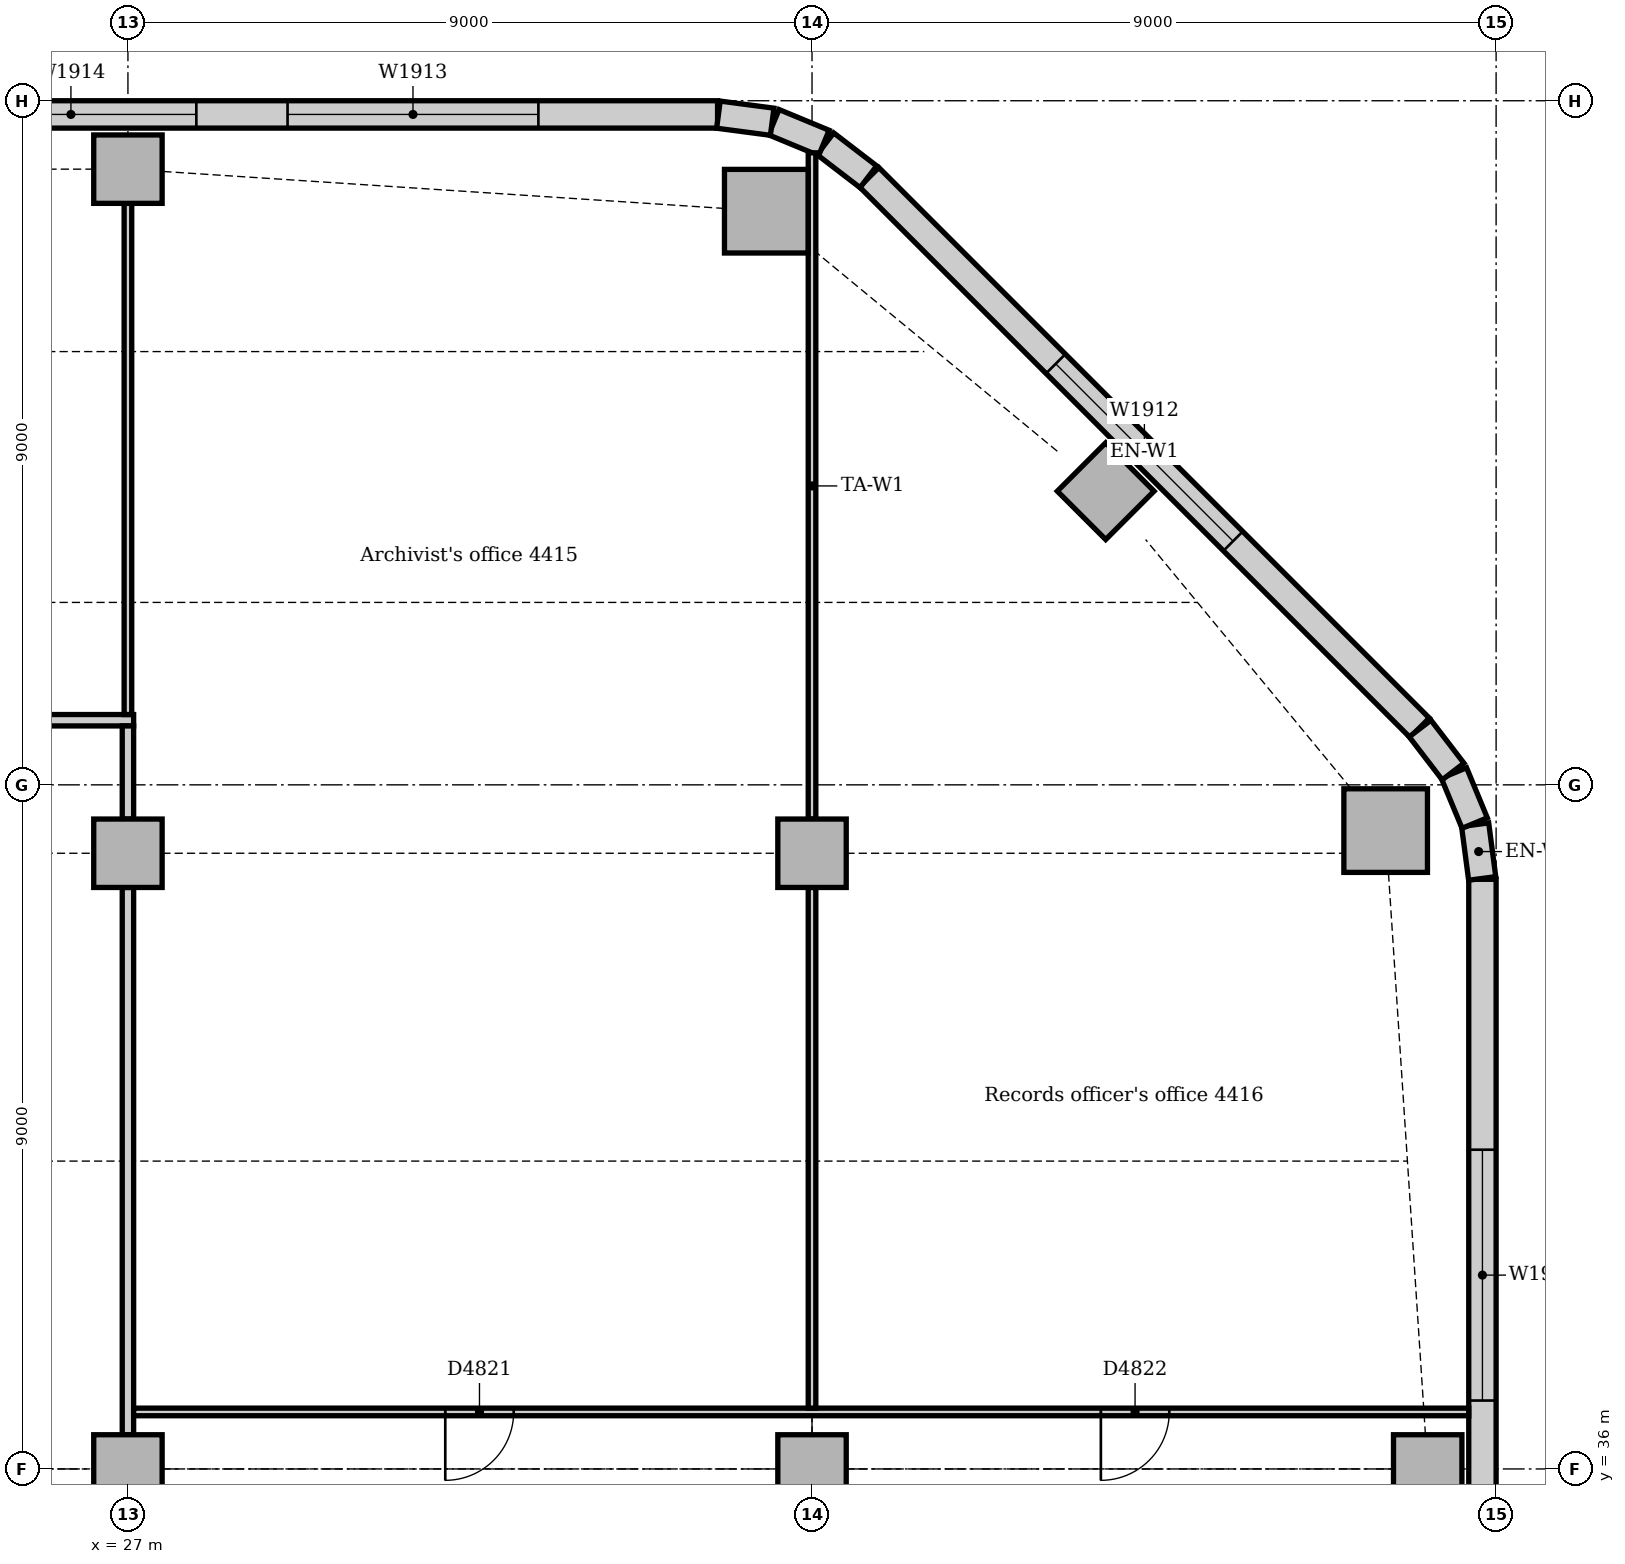
"""IFC4 building model, lengths in metres.
Left out: names, types, materials, properties, quantities, classifications, styles, units other than length and angle.
Written with IfcOpenShell. Run it as: python <this file> out.ifc"""

import sys

from ifc_helpers import new_model, si_unit, direction, frame, frame_2d, origin, origin_2d, place, context, subcontext, project, spatial, rectangle, extrude, element, fill, save


model = new_model("IFC4")
c1 = context("Model", 3, precision=1e-05, world=origin(), true_north=direction((0.0, 1.0)))
c2 = subcontext(c1, "Body", "Model", "MODEL_VIEW")
j1 = project(units=[si_unit("LENGTHUNIT", "METRE"), si_unit("PLANEANGLEUNIT", "RADIAN")], contexts=[c1])
p1 = place(None, origin())
s1 = spatial("IfcSite", under=j1, at=p1, CompositionType="ELEMENT")
p2 = place(p1, origin())
s2 = spatial("IfcBuilding", under=s1, at=p2, CompositionType="ELEMENT")
p3 = place(p2, frame((0.0, 0.0, 185.0)))
s3 = spatial("IfcBuildingStorey", under=s2, at=p3, CompositionType="ELEMENT", Elevation=185.0)
for number, where, z_axis, x_axis in (
    (1, (43.547, 44.398, 0.0), (0.0, 0.0, 1.0), (1.0, 0.0, 0.0)),
    (2, (35.398, 52.547, 0.0), (0.0, 0.0, 1.0), (1.0, 0.0, 0.0)),
):
    element("IfcColumn", number, at=place(p3, frame(where, z_axis=z_axis, x_axis=x_axis)), inside=s3, PredefinedType="COLUMN", context=c2, shape_type="SweptSolid", body=[
        extrude(rectangle(XDim=1.1, YDim=1.1, at=origin_2d()), origin(), (0.0, 0.0, 1.0), 3.85),
    ])
for number, where, z_axis, x_axis in (
    (3, (44.1, 36.0, 0.0), (0.0, 0.0, 1.0), (1.0, 0.0, 0.0)),
    (4, (39.864, 48.864, 0.0), (0.0, 0.0, 1.0), (0.707, 0.707, 0.0)),
    (5, (27.0, 53.1, 0.0), (0.0, 0.0, 1.0), (1.0, 0.0, 0.0)),
    (6, (27.0, 36.0, 0.0), (0.0, 0.0, 1.0), (1.0, 0.0, 0.0)),
    (7, (27.0, 44.1, 0.0), (0.0, 0.0, 1.0), (1.0, 0.0, 0.0)),
    (8, (36.0, 36.0, 0.0), (0.0, 0.0, 1.0), (1.0, 0.0, 0.0)),
    (9, (36.0, 44.1, 0.0), (0.0, 0.0, 1.0), (1.0, 0.0, 0.0)),
):
    element("IfcColumn", number, at=place(p3, frame(where, z_axis=z_axis, x_axis=x_axis)), inside=s3, PredefinedType="COLUMN", context=c2, shape_type="SweptSolid", body=[
        extrude(rectangle(XDim=0.9, YDim=0.9, at=origin_2d()), origin(), (0.0, 0.0, 1.0), 3.85),
    ])
p4 = place(p3, frame((44.82, 19.243, 0.0), z_axis=(0.0, 0.0, 1.0), x_axis=(0.0, 1.0, 0.0)))
e10 = element("IfcWall", 10, at=p4, inside=s3, PredefinedType="STANDARD", context=c2, shape_type="SweptSolid", body=[
    extrude(rectangle(XDim=24.515, YDim=0.36, at=frame_2d((12.257, 0.0))), origin(), (0.0, 0.0, 1.0), 3.85),
])
p5 = place(p4, frame((3.507, 0.0, 0.9)))
e11 = element("IfcOpeningElement", 11, at=p5, cuts=e10, PredefinedType="OPENING", context=c2, shape_type="SweptSolid", body=[
    extrude(rectangle(XDim=3.3, YDim=1.6, at=frame_2d((1.65, 0.8))), frame((0.0, 0.19, 0.0), z_axis=(0.0, -1.0, 0.0), x_axis=(1.0, 0.0, 0.0)), (0.0, 0.0, 1.0), 0.38),
])
p6 = place(p4, frame((8.357, 0.0, 0.9)))
e12 = element("IfcOpeningElement", 12, at=p6, cuts=e10, PredefinedType="OPENING", context=c2, shape_type="SweptSolid", body=[
    extrude(rectangle(XDim=3.3, YDim=1.6, at=frame_2d((1.65, 0.8))), frame((0.0, 0.19, 0.0), z_axis=(0.0, -1.0, 0.0), x_axis=(1.0, 0.0, 0.0)), (0.0, 0.0, 1.0), 0.38),
])
p7 = place(p4, frame((12.857, 0.0, 0.9)))
e13 = element("IfcOpeningElement", 13, at=p7, cuts=e10, PredefinedType="OPENING", context=c2, shape_type="SweptSolid", body=[
    extrude(rectangle(XDim=3.3, YDim=1.6, at=frame_2d((1.65, 0.8))), frame((0.0, 0.19, 0.0), z_axis=(0.0, -1.0, 0.0), x_axis=(1.0, 0.0, 0.0)), (0.0, 0.0, 1.0), 0.38),
])
p8 = place(p4, frame((17.657, 0.0, 0.9)))
e14 = element("IfcOpeningElement", 14, at=p8, cuts=e10, PredefinedType="OPENING", context=c2, shape_type="SweptSolid", body=[
    extrude(rectangle(XDim=3.3, YDim=1.6, at=frame_2d((1.65, 0.8))), frame((0.0, 0.19, 0.0), z_axis=(0.0, -1.0, 0.0), x_axis=(1.0, 0.0, 0.0)), (0.0, 0.0, 1.0), 0.38),
])
p9 = place(p3, frame((43.994, 45.751, 0.0), z_axis=(0.0, 0.0, 1.0), x_axis=(-0.707106781187, 0.707106781187, 0.0)))
e15 = element("IfcWall", 15, at=p9, inside=s3, PredefinedType="STANDARD", context=c2, shape_type="SweptSolid", body=[
    extrude(rectangle(XDim=10.243, YDim=0.36, at=frame_2d((5.121, 0.0))), origin(), (0.0, 0.0, 1.0), 3.85),
])
p10 = place(p9, frame((3.471, 0.0, 0.9)))
e16 = element("IfcOpeningElement", 16, at=p10, cuts=e15, PredefinedType="OPENING", context=c2, shape_type="SweptSolid", body=[
    extrude(rectangle(XDim=3.3, YDim=1.6, at=frame_2d((1.65, 0.8))), frame((0.0, 0.19, 0.0), z_axis=(0.0, -1.0, 0.0), x_axis=(1.0, 0.0, 0.0)), (0.0, 0.0, 1.0), 0.38),
])
p11 = place(p3, frame((34.757, 53.82, 0.0), z_axis=(0.0, 0.0, 1.0), x_axis=(-1.0, 0.0, 0.0)))
e17 = element("IfcWall", 17, at=p11, inside=s3, PredefinedType="STANDARD", context=c2, shape_type="SweptSolid", body=[
    extrude(rectangle(XDim=30.515, YDim=0.36, at=frame_2d((15.257, 0.0))), origin(), (0.0, 0.0, 1.0), 3.85),
])
p12 = place(p11, frame((2.357, 0.0, 0.9)))
e18 = element("IfcOpeningElement", 18, at=p12, cuts=e17, PredefinedType="OPENING", context=c2, shape_type="SweptSolid", body=[
    extrude(rectangle(XDim=3.3, YDim=1.6, at=frame_2d((1.65, 0.8))), frame((0.0, 0.19, 0.0), z_axis=(0.0, -1.0, 0.0), x_axis=(1.0, 0.0, 0.0)), (0.0, 0.0, 1.0), 0.38),
])
p13 = place(p11, frame((6.857, 0.0, 0.9)))
e19 = element("IfcOpeningElement", 19, at=p13, cuts=e17, PredefinedType="OPENING", context=c2, shape_type="SweptSolid", body=[
    extrude(rectangle(XDim=3.3, YDim=1.6, at=frame_2d((1.65, 0.8))), frame((0.0, 0.19, 0.0), z_axis=(0.0, -1.0, 0.0), x_axis=(1.0, 0.0, 0.0)), (0.0, 0.0, 1.0), 0.38),
])
p14 = place(p11, frame((11.357, 0.0, 0.9)))
e20 = element("IfcOpeningElement", 20, at=p14, cuts=e17, PredefinedType="OPENING", context=c2, shape_type="SweptSolid", body=[
    extrude(rectangle(XDim=3.3, YDim=1.6, at=frame_2d((1.65, 0.8))), frame((0.0, 0.19, 0.0), z_axis=(0.0, -1.0, 0.0), x_axis=(1.0, 0.0, 0.0)), (0.0, 0.0, 1.0), 0.38),
])
p15 = place(p11, frame((15.857, 0.0, 0.9)))
e21 = element("IfcOpeningElement", 21, at=p15, cuts=e17, PredefinedType="OPENING", context=c2, shape_type="SweptSolid", body=[
    extrude(rectangle(XDim=3.3, YDim=1.6, at=frame_2d((1.65, 0.8))), frame((0.0, 0.19, 0.0), z_axis=(0.0, -1.0, 0.0), x_axis=(1.0, 0.0, 0.0)), (0.0, 0.0, 1.0), 0.38),
])
p16 = place(p11, frame((21.457, 0.0, 0.9)))
e22 = element("IfcOpeningElement", 22, at=p16, cuts=e17, PredefinedType="OPENING", context=c2, shape_type="SweptSolid", body=[
    extrude(rectangle(XDim=1.8, YDim=1.6, at=frame_2d((0.9, 0.8))), frame((0.0, 0.19, 0.0), z_axis=(0.0, -1.0, 0.0), x_axis=(1.0, 0.0, 0.0)), (0.0, 0.0, 1.0), 0.38),
])
p17 = place(p11, frame((24.857, 0.0, 0.9)))
e23 = element("IfcOpeningElement", 23, at=p17, cuts=e17, PredefinedType="OPENING", context=c2, shape_type="SweptSolid", body=[
    extrude(rectangle(XDim=3.3, YDim=1.6, at=frame_2d((1.65, 0.8))), frame((0.0, 0.19, 0.0), z_axis=(0.0, -1.0, 0.0), x_axis=(1.0, 0.0, 0.0)), (0.0, 0.0, 1.0), 0.38),
])
for number, where, z_axis, x_axis in (
    (24, (44.817, 43.769, 0.0), (0.0, 0.0, 1.0), (-0.131, 0.991, 0.0)),
    (25, (44.718, 44.497, 0.0), (0.0, 0.0, 1.0), (-0.383, 0.924, 0.0)),
):
    element("IfcWall", number, at=place(p3, frame(where, z_axis=z_axis, x_axis=x_axis)), inside=s3, PredefinedType="STANDARD", context=c2, shape_type="SweptSolid", body=[
        extrude(rectangle(XDim=0.713, YDim=0.36, at=frame_2d((0.356, 0.0))), origin(), (0.0, 0.0, 1.0), 3.85),
    ])
for number, where, z_axis, x_axis in (
    (26, (44.434, 45.175, 0.0), (0.0, 0.0, 1.0), (-0.609, 0.793, 0.0)),
    (27, (36.741, 53.0, 0.0), (0.0, 0.0, 1.0), (-0.793, 0.609, 0.0)),
):
    element("IfcWall", number, at=place(p3, frame(where, z_axis=z_axis, x_axis=x_axis)), inside=s3, PredefinedType="STANDARD", context=c2, shape_type="SweptSolid", body=[
        extrude(rectangle(XDim=0.713, YDim=0.36, at=frame_2d((0.357, 0.0))), origin(), (0.0, 0.0, 1.0), 3.85),
    ])
for number, where, z_axis, x_axis in (
    (28, (36.156, 53.445, 0.0), (0.0, 0.0, 1.0), (-0.924, 0.383, 0.0)),
    (29, (35.476, 53.724, 0.0), (0.0, 0.0, 1.0), (-0.991, 0.131, 0.0)),
):
    element("IfcWall", number, at=place(p3, frame(where, z_axis=z_axis, x_axis=x_axis)), inside=s3, PredefinedType="STANDARD", context=c2, shape_type="SweptSolid", body=[
        extrude(rectangle(XDim=0.713, YDim=0.36, at=frame_2d((0.356, 0.0))), origin(), (0.0, 0.0, 1.0), 3.85),
    ])
p18 = place(p3, frame((1.903, 45.85, 0.0), z_axis=(0.0, 0.0, 1.0), x_axis=(1.0, 0.0, 0.0)))
e30 = element("IfcWall", 30, at=p18, inside=s3, PredefinedType="PARTITIONING", context=c2, shape_type="SweptSolid", body=[
    extrude(rectangle(XDim=25.172, YDim=0.15, at=frame_2d((12.586, 0.0))), origin(), (0.0, 0.0, 1.0), 3.85),
])
p19 = place(p18, frame((5.4, 0.0, 0.0)))
e31 = element("IfcOpeningElement", 31, at=p19, cuts=e30, PredefinedType="OPENING", context=c2, shape_type="SweptSolid", body=[
    extrude(rectangle(XDim=0.9, YDim=2.1, at=frame_2d((0.45, 1.05))), frame((0.0, 0.085, 0.0), z_axis=(0.0, -1.0, 0.0), x_axis=(1.0, 0.0, 0.0)), (0.0, 0.0, 1.0), 0.17),
])
p20 = place(p18, frame((15.647, 0.0, 0.0)))
e32 = element("IfcOpeningElement", 32, at=p20, cuts=e30, PredefinedType="OPENING", context=c2, shape_type="SweptSolid", body=[
    extrude(rectangle(XDim=0.9, YDim=2.1, at=frame_2d((0.45, 1.05))), frame((0.0, 0.085, 0.0), z_axis=(0.0, -1.0, 0.0), x_axis=(1.0, 0.0, 0.0)), (0.0, 0.0, 1.0), 0.17),
])
p21 = place(p3, frame((27.0, 36.45, 0.0), z_axis=(0.0, 0.0, 1.0), x_axis=(0.0, 1.0, 0.0)))
e33 = element("IfcWall", 33, at=p21, inside=s3, PredefinedType="PARTITIONING", context=c2, shape_type="SweptSolid", body=[
    extrude(rectangle(XDim=7.2, YDim=0.15, at=frame_2d((3.6, 0.0))), origin(), (0.0, 0.0, 1.0), 3.362),
])
p22 = place(p3, frame((27.0, 44.55, 0.0), z_axis=(0.0, 0.0, 1.0), x_axis=(0.0, 1.0, 0.0)))
e34 = element("IfcWall", 34, at=p22, inside=s3, PredefinedType="PARTITIONING", context=c2, shape_type="SweptSolid", body=[
    extrude(rectangle(XDim=1.225, YDim=0.15, at=frame_2d((0.613, 0.0))), origin(), (0.0, 0.0, 1.0), 3.362),
])
p23 = place(p3, frame((27.075, 36.75, 0.0), z_axis=(0.0, 0.0, 1.0), x_axis=(1.0, 0.0, 0.0)))
e35 = element("IfcWall", 35, at=p23, inside=s3, PredefinedType="PARTITIONING", context=c2, shape_type="SweptSolid", body=[
    extrude(rectangle(XDim=17.565, YDim=0.1, at=frame_2d((8.783, 0.0))), origin(), (0.0, 0.0, 1.0), 3.85),
])
p24 = place(p23, frame((4.1, 0.0, 0.0)))
e36 = element("IfcOpeningElement", 36, at=p24, cuts=e35, PredefinedType="OPENING", context=c2, shape_type="SweptSolid", body=[
    extrude(rectangle(XDim=0.9, YDim=2.1, at=frame_2d((0.45, 1.05))), frame((0.0, 0.06, 0.0), z_axis=(0.0, -1.0, 0.0), x_axis=(1.0, 0.0, 0.0)), (0.0, 0.0, 1.0), 0.12),
])
p25 = place(p23, frame((12.725, 0.0, 0.0)))
e37 = element("IfcOpeningElement", 37, at=p25, cuts=e35, PredefinedType="OPENING", context=c2, shape_type="SweptSolid", body=[
    extrude(rectangle(XDim=0.9, YDim=2.1, at=frame_2d((0.45, 1.05))), frame((0.0, 0.06, 0.0), z_axis=(0.0, -1.0, 0.0), x_axis=(1.0, 0.0, 0.0)), (0.0, 0.0, 1.0), 0.12),
])
p26 = place(p3, frame((36.0, 36.8, 0.0), z_axis=(0.0, 0.0, 1.0), x_axis=(0.0, 1.0, 0.0)))
e38 = element("IfcWall", 38, at=p26, inside=s3, PredefinedType="PARTITIONING", context=c2, shape_type="SweptSolid", body=[
    extrude(rectangle(XDim=6.85, YDim=0.1, at=frame_2d((3.425, 0.0))), origin(), (0.0, 0.0, 1.0), 3.362),
])
p27 = place(p3, frame((36.0, 44.55, 0.0), z_axis=(0.0, 0.0, 1.0), x_axis=(0.0, 1.0, 0.0)))
e39 = element("IfcWall", 39, at=p27, inside=s3, PredefinedType="PARTITIONING", context=c2, shape_type="SweptSolid", body=[
    extrude(rectangle(XDim=8.765, YDim=0.1, at=frame_2d((4.383, 0.0))), origin(), (0.0, 0.0, 1.0), 3.362),
])
p28 = place(p3, frame((27.0, 45.925, 0.0), z_axis=(0.0, 0.0, 1.0), x_axis=(0.0, 1.0, 0.0)))
e40 = element("IfcWall", 40, at=p28, inside=s3, PredefinedType="PARTITIONING", context=c2, shape_type="SweptSolid", body=[
    extrude(rectangle(XDim=6.725, YDim=0.1, at=frame_2d((3.362, 0.0))), origin(), (0.0, 0.0, 1.0), 3.362),
])
p29 = place(p8, origin())
e41 = element("IfcWindow", 41, at=p29, inside=s3, PartitioningType="SINGLE_PANEL", PredefinedType="WINDOW", context=c2, shape_type="SweptSolid", body=[
    extrude(rectangle(XDim=3.3, YDim=1.6, at=frame_2d((1.65, 0.8))), frame((0.0, 0.13, 0.0), z_axis=(0.0, -1.0, 0.0), x_axis=(1.0, 0.0, 0.0)), (0.0, 0.0, 1.0), 0.06),
])
fill(e14, e41)
p30 = place(p10, origin())
e42 = element("IfcWindow", 42, at=p30, inside=s3, PartitioningType="SINGLE_PANEL", PredefinedType="WINDOW", context=c2, shape_type="SweptSolid", body=[
    extrude(rectangle(XDim=3.3, YDim=1.6, at=frame_2d((1.65, 0.8))), frame((0.0, 0.13, 0.0), z_axis=(0.0, -1.0, 0.0), x_axis=(1.0, 0.0, 0.0)), (0.0, 0.0, 1.0), 0.06),
])
fill(e16, e42)
p31 = place(p12, origin())
e43 = element("IfcWindow", 43, at=p31, inside=s3, PartitioningType="SINGLE_PANEL", PredefinedType="WINDOW", context=c2, shape_type="SweptSolid", body=[
    extrude(rectangle(XDim=3.3, YDim=1.6, at=frame_2d((1.65, 0.8))), frame((0.0, 0.13, 0.0), z_axis=(0.0, -1.0, 0.0), x_axis=(1.0, 0.0, 0.0)), (0.0, 0.0, 1.0), 0.06),
])
fill(e18, e43)
p32 = place(p13, origin())
e44 = element("IfcWindow", 44, at=p32, inside=s3, PartitioningType="SINGLE_PANEL", PredefinedType="WINDOW", context=c2, shape_type="SweptSolid", body=[
    extrude(rectangle(XDim=3.3, YDim=1.6, at=frame_2d((1.65, 0.8))), frame((0.0, 0.13, 0.0), z_axis=(0.0, -1.0, 0.0), x_axis=(1.0, 0.0, 0.0)), (0.0, 0.0, 1.0), 0.06),
])
fill(e19, e44)
p33 = place(p24, frame((0.9, 0.0, 0.0), z_axis=(0.0, 0.0, 1.0), x_axis=(-1.0, 0.0, 0.0)))
e45 = element("IfcDoor", 45, at=p33, inside=s3, OperationType="SINGLE_SWING_RIGHT", PredefinedType="DOOR", context=c2, shape_type="SweptSolid", body=[
    extrude(rectangle(XDim=0.9, YDim=2.1, at=frame_2d((0.45, 1.05))), frame((0.0, 0.025, 0.0), z_axis=(0.0, -1.0, 0.0), x_axis=(1.0, 0.0, 0.0)), (0.0, 0.0, 1.0), 0.05),
])
fill(e36, e45)
p34 = place(p25, frame((0.9, 0.0, 0.0), z_axis=(0.0, 0.0, 1.0), x_axis=(-1.0, 0.0, 0.0)))
e46 = element("IfcDoor", 46, at=p34, inside=s3, OperationType="SINGLE_SWING_RIGHT", PredefinedType="DOOR", context=c2, shape_type="SweptSolid", body=[
    extrude(rectangle(XDim=0.9, YDim=2.1, at=frame_2d((0.45, 1.05))), frame((0.0, 0.025, 0.0), z_axis=(0.0, -1.0, 0.0), x_axis=(1.0, 0.0, 0.0)), (0.0, 0.0, 1.0), 0.05),
])
fill(e37, e46)
save(model, sys.argv[1])
